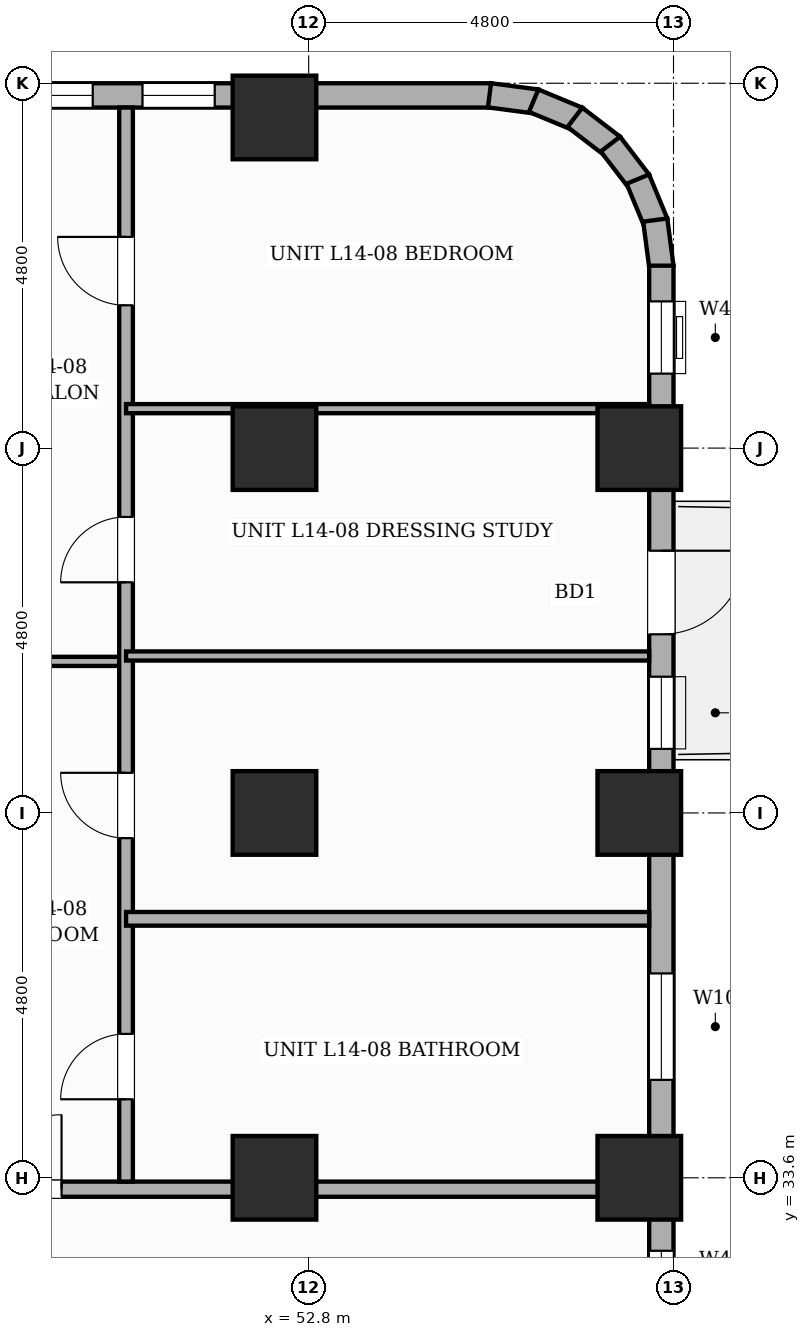
"""IFC4 building model, lengths in metres.
Left out: names, types, materials, properties, quantities, classifications, styles, units other than length and angle.
Written with IfcOpenShell. Run it as: python <this file> out.ifc"""

import sys

from ifc_helpers import new_model, si_unit, direction, frame, frame_2d, origin, origin_2d, place, context, subcontext, project, spatial, rectangle, extrude, element, fill, save


model = new_model("IFC4")
c1 = context("Model", 3, precision=1e-05, world=origin(), true_north=direction((0.0, 1.0)))
c2 = subcontext(c1, "Body", "Model", "MODEL_VIEW")
j1 = project(units=[si_unit("LENGTHUNIT", "METRE"), si_unit("PLANEANGLEUNIT", "RADIAN")], contexts=[c1])
p1 = place(None, origin())
s1 = spatial("IfcSite", under=j1, at=p1, CompositionType="ELEMENT")
p2 = place(p1, origin())
s2 = spatial("IfcBuilding", under=s1, at=p2, CompositionType="ELEMENT")
p3 = place(p2, frame((0.0, 0.0, 57.4)))
s3 = spatial("IfcBuildingStorey", under=s2, at=p3, CompositionType="ELEMENT", Elevation=57.4)
for number, where, z_axis, x_axis in (
    (1, (52.35, 33.6, 0.0), (0.0, 0.0, 1.0), (1.0, 0.0, 0.0)),
    (2, (52.35, 38.4, 0.0), (0.0, 0.0, 1.0), (1.0, 0.0, 0.0)),
    (3, (52.35, 43.2, 0.0), (0.0, 0.0, 1.0), (1.0, 0.0, 0.0)),
    (4, (52.35, 47.55, 0.0), (0.0, 0.0, 1.0), (1.0, 0.0, 0.0)),
    (5, (57.15, 33.6, 0.0), (0.0, 0.0, 1.0), (1.0, 0.0, 0.0)),
    (6, (57.15, 38.4, 0.0), (0.0, 0.0, 1.0), (1.0, 0.0, 0.0)),
    (7, (57.15, 43.2, 0.0), (0.0, 0.0, 1.0), (1.0, 0.0, 0.0)),
):
    element("IfcColumn", number, at=place(p3, frame(where, z_axis=z_axis, x_axis=x_axis)), inside=s3, PredefinedType="COLUMN", context=c2, shape_type="SweptSolid", body=[
        extrude(rectangle(XDim=1.1, YDim=1.1, at=origin_2d()), origin(), (0.0, 0.0, 1.0), 3.6),
    ])
p4 = place(p3, frame((7.2, 47.84, 0.0), z_axis=(0.0, 0.0, 1.0), x_axis=(1.0, 0.0, 0.0)))
e8 = element("IfcWall", 8, at=p4, inside=s3, PredefinedType="STANDARD", context=c2, shape_type="SweptSolid", body=[
    extrude(rectangle(XDim=48.0, YDim=0.32, at=frame_2d((24.0, 0.0))), origin(), (0.0, 0.0, 1.0), 2.53),
])
p5 = place(p4, frame((28.803, 0.0, 0.65)))
e9 = element("IfcOpeningElement", 9, at=p5, cuts=e8, PredefinedType="OPENING", context=c2, shape_type="SweptSolid", body=[
    extrude(rectangle(XDim=1.4, YDim=1.1, at=frame_2d((0.7, 0.55))), frame((0.0, 0.17, 0.0), z_axis=(0.0, -1.0, 0.0), x_axis=(1.0, 0.0, 0.0)), (0.0, 0.0, 1.0), 0.34),
])
p6 = place(p4, frame((43.414, 0.0, 0.45)))
e10 = element("IfcOpeningElement", 10, at=p6, cuts=e8, PredefinedType="OPENING", context=c2, shape_type="SweptSolid", body=[
    extrude(rectangle(XDim=0.95, YDim=1.8, at=frame_2d((0.475, 0.9))), frame((0.0, 0.17, 0.0), z_axis=(0.0, -1.0, 0.0), x_axis=(1.0, 0.0, 0.0)), (0.0, 0.0, 1.0), 0.34),
])
p7 = place(p4, frame((18.74, 0.0, 0.45)))
e11 = element("IfcOpeningElement", 11, at=p7, cuts=e8, PredefinedType="OPENING", context=c2, shape_type="SweptSolid", body=[
    extrude(rectangle(XDim=0.95, YDim=1.8, at=frame_2d((0.475, 0.9))), frame((0.0, 0.17, 0.0), z_axis=(0.0, -1.0, 0.0), x_axis=(1.0, 0.0, 0.0)), (0.0, 0.0, 1.0), 0.34),
])
p8 = place(p4, frame((37.825, 0.0, 0.65)))
e12 = element("IfcOpeningElement", 12, at=p8, cuts=e8, PredefinedType="OPENING", context=c2, shape_type="SweptSolid", body=[
    extrude(rectangle(XDim=1.4, YDim=1.1, at=frame_2d((0.7, 0.55))), frame((0.0, 0.17, 0.0), z_axis=(0.0, -1.0, 0.0), x_axis=(1.0, 0.0, 0.0)), (0.0, 0.0, 1.0), 0.34),
])
p9 = place(p4, frame((0.47, 0.0, 0.45)))
e13 = element("IfcOpeningElement", 13, at=p9, cuts=e8, PredefinedType="OPENING", context=c2, shape_type="SweptSolid", body=[
    extrude(rectangle(XDim=0.95, YDim=1.8, at=frame_2d((0.475, 0.9))), frame((0.0, 0.17, 0.0), z_axis=(0.0, -1.0, 0.0), x_axis=(1.0, 0.0, 0.0)), (0.0, 0.0, 1.0), 0.34),
])
p10 = place(p4, frame((5.265, 0.0, 0.45)))
e14 = element("IfcOpeningElement", 14, at=p10, cuts=e8, PredefinedType="OPENING", context=c2, shape_type="SweptSolid", body=[
    extrude(rectangle(XDim=0.95, YDim=1.8, at=frame_2d((0.475, 0.9))), frame((0.0, 0.17, 0.0), z_axis=(0.0, -1.0, 0.0), x_axis=(1.0, 0.0, 0.0)), (0.0, 0.0, 1.0), 0.34),
])
p11 = place(p4, frame((23.43, 0.0, 0.65)))
e15 = element("IfcOpeningElement", 15, at=p11, cuts=e8, PredefinedType="OPENING", context=c2, shape_type="SweptSolid", body=[
    extrude(rectangle(XDim=1.4, YDim=1.1, at=frame_2d((0.7, 0.55))), frame((0.0, 0.17, 0.0), z_axis=(0.0, -1.0, 0.0), x_axis=(1.0, 0.0, 0.0)), (0.0, 0.0, 1.0), 0.34),
])
p12 = place(p4, frame((41.809, 0.0, 0.45)))
e16 = element("IfcOpeningElement", 16, at=p12, cuts=e8, PredefinedType="OPENING", context=c2, shape_type="SweptSolid", body=[
    extrude(rectangle(XDim=0.95, YDim=1.8, at=frame_2d((0.475, 0.9))), frame((0.0, 0.17, 0.0), z_axis=(0.0, -1.0, 0.0), x_axis=(1.0, 0.0, 0.0)), (0.0, 0.0, 1.0), 0.34),
])
for number, where, z_axis, x_axis in (
    (17, (55.179, 47.841, 0.0), (0.0, 0.0, 1.0), (0.991, -0.131, 0.0)),
    (18, (55.76, 47.771, 0.0), (0.0, 0.0, 1.0), (0.924, -0.383, 0.0)),
):
    element("IfcWall", number, at=place(p3, frame(where, z_axis=z_axis, x_axis=x_axis)), inside=s3, PredefinedType="STANDARD", context=c2, shape_type="SweptSolid", body=[
        extrude(rectangle(XDim=0.626, YDim=0.32, at=frame_2d((0.313, 0.0))), origin(), (0.0, 0.0, 1.0), 3.35),
    ])
p13 = place(p3, frame((56.302, 47.552, 0.0), z_axis=(0.0, 0.0, 1.0), x_axis=(0.793549926411, -0.608505147302, 0.0)))
e19 = element("IfcWall", 19, at=p13, inside=s3, PredefinedType="STANDARD", context=c2, shape_type="SweptSolid", body=[
    extrude(rectangle(XDim=0.627, YDim=0.32, at=frame_2d((0.313, 0.0))), origin(), (0.0, 0.0, 1.0), 3.35),
])
for number, where, z_axis, x_axis in (
    (20, (56.77, 47.2, 0.0), (0.0, 0.0, 1.0), (0.609, -0.793, 0.0)),
    (21, (57.131, 46.739, 0.0), (0.0, 0.0, 1.0), (0.383, -0.924, 0.0)),
    (22, (57.36, 46.2, 0.0), (0.0, 0.0, 1.0), (0.131, -0.991, 0.0)),
):
    element("IfcWall", number, at=place(p3, frame(where, z_axis=z_axis, x_axis=x_axis)), inside=s3, PredefinedType="STANDARD", context=c2, shape_type="SweptSolid", body=[
        extrude(rectangle(XDim=0.626, YDim=0.32, at=frame_2d((0.313, 0.0))), origin(), (0.0, 0.0, 1.0), 3.35),
    ])
p14 = place(p3, frame((57.44, 45.6, 0.0), z_axis=(0.0, 0.0, 1.0), x_axis=(0.0, -1.0, 0.0)))
e23 = element("IfcWall", 23, at=p14, inside=s3, PredefinedType="STANDARD", context=c2, shape_type="SweptSolid", body=[
    extrude(rectangle(XDim=14.4, YDim=0.32, at=frame_2d((7.2, 0.0))), origin(), (0.0, 0.0, 1.0), 2.53),
])
p15 = place(p14, frame((3.75, 0.0, 0.0)))
e24 = element("IfcOpeningElement", 24, at=p15, cuts=e23, PredefinedType="OPENING", context=c2, shape_type="SweptSolid", body=[
    extrude(rectangle(XDim=1.1, YDim=2.15, at=frame_2d((0.55, 1.075))), frame((0.0, 0.17, 0.0), z_axis=(0.0, -1.0, 0.0), x_axis=(1.0, 0.0, 0.0)), (0.0, 0.0, 1.0), 0.34),
])
p16 = place(p14, frame((0.47, 0.0, 0.45)))
e25 = element("IfcOpeningElement", 25, at=p16, cuts=e23, PredefinedType="OPENING", context=c2, shape_type="SweptSolid", body=[
    extrude(rectangle(XDim=0.95, YDim=1.8, at=frame_2d((0.475, 0.9))), frame((0.0, 0.17, 0.0), z_axis=(0.0, -1.0, 0.0), x_axis=(1.0, 0.0, 0.0)), (0.0, 0.0, 1.0), 0.34),
])
p17 = place(p14, frame((12.96, 0.0, 0.45)))
e26 = element("IfcOpeningElement", 26, at=p17, cuts=e23, PredefinedType="OPENING", context=c2, shape_type="SweptSolid", body=[
    extrude(rectangle(XDim=0.95, YDim=1.8, at=frame_2d((0.475, 0.9))), frame((0.0, 0.17, 0.0), z_axis=(0.0, -1.0, 0.0), x_axis=(1.0, 0.0, 0.0)), (0.0, 0.0, 1.0), 0.34),
])
p18 = place(p14, frame((9.312, 0.0, 0.65)))
e27 = element("IfcOpeningElement", 27, at=p18, cuts=e23, PredefinedType="OPENING", context=c2, shape_type="SweptSolid", body=[
    extrude(rectangle(XDim=1.4, YDim=1.1, at=frame_2d((0.7, 0.55))), frame((0.0, 0.17, 0.0), z_axis=(0.0, -1.0, 0.0), x_axis=(1.0, 0.0, 0.0)), (0.0, 0.0, 1.0), 0.34),
])
p19 = place(p14, frame((5.407, 0.0, 0.45)))
e28 = element("IfcOpeningElement", 28, at=p19, cuts=e23, PredefinedType="OPENING", context=c2, shape_type="SweptSolid", body=[
    extrude(rectangle(XDim=0.95, YDim=1.8, at=frame_2d((0.475, 0.9))), frame((0.0, 0.17, 0.0), z_axis=(0.0, -1.0, 0.0), x_axis=(1.0, 0.0, 0.0)), (0.0, 0.0, 1.0), 0.34),
])
p20 = place(p3, frame((44.02, 33.45, 0.0), z_axis=(0.0, 0.0, 1.0), x_axis=(1.0, 0.0, 0.0)))
e29 = element("IfcWall", 29, at=p20, inside=s3, PredefinedType="PARTITIONING", context=c2, shape_type="SweptSolid", body=[
    extrude(rectangle(XDim=13.26, YDim=0.2, at=frame_2d((6.63, 0.0))), origin(), (0.0, 0.0, 1.0), 2.53),
])
p21 = place(p20, frame((4.549, 0.0, 0.0)))
e30 = element("IfcOpeningElement", 30, at=p21, cuts=e29, PredefinedType="OPENING", context=c2, shape_type="SweptSolid", body=[
    extrude(rectangle(XDim=0.98, YDim=2.18, at=frame_2d((0.49, 1.09))), frame((0.0, 0.11, 0.0), z_axis=(0.0, -1.0, 0.0), x_axis=(1.0, 0.0, 0.0)), (0.0, 0.0, 1.0), 0.22),
])
p22 = place(p3, frame((47.64, 40.394, 0.0), z_axis=(0.0, 0.0, 1.0), x_axis=(1.0, 0.0, 0.0)))
e31 = element("IfcWall", 31, at=p22, inside=s3, PredefinedType="PARTITIONING", context=c2, shape_type="SweptSolid", body=[
    extrude(rectangle(XDim=2.757, YDim=0.12, at=frame_2d((1.378, 0.0))), origin(), (0.0, 0.0, 1.0), 3.35),
])
p23 = place(p22, frame((0.8, 0.0, 0.0)))
e32 = element("IfcOpeningElement", 32, at=p23, cuts=e31, PredefinedType="OPENING", context=c2, shape_type="SweptSolid", body=[
    extrude(rectangle(XDim=0.9, YDim=2.15, at=frame_2d((0.45, 1.075))), frame((0.0, 0.07, 0.0), z_axis=(0.0, -1.0, 0.0), x_axis=(1.0, 0.0, 0.0)), (0.0, 0.0, 1.0), 0.14),
])
p24 = place(p3, frame((50.397, 33.55, 0.0), z_axis=(0.0, 0.0, 1.0), x_axis=(0.0, 1.0, 0.0)))
e33 = element("IfcWall", 33, at=p24, inside=s3, PredefinedType="PLUMBINGWALL", context=c2, shape_type="SweptSolid", body=[
    extrude(rectangle(XDim=14.13, YDim=0.18, at=frame_2d((7.065, 0.0))), origin(), (0.0, 0.0, 1.0), 3.35),
])
p25 = place(p24, frame((1.083, 0.0, 0.0)))
e34 = element("IfcOpeningElement", 34, at=p25, cuts=e33, PredefinedType="OPENING", context=c2, shape_type="SweptSolid", body=[
    extrude(rectangle(XDim=0.86, YDim=2.1, at=frame_2d((0.43, 1.05))), frame((0.0, 0.1, 0.0), z_axis=(0.0, -1.0, 0.0), x_axis=(1.0, 0.0, 0.0)), (0.0, 0.0, 1.0), 0.2),
])
p26 = place(p24, frame((4.518, 0.0, 0.0)))
e35 = element("IfcOpeningElement", 35, at=p26, cuts=e33, PredefinedType="OPENING", context=c2, shape_type="SweptSolid", body=[
    extrude(rectangle(XDim=0.86, YDim=2.1, at=frame_2d((0.43, 1.05))), frame((0.0, 0.1, 0.0), z_axis=(0.0, -1.0, 0.0), x_axis=(1.0, 0.0, 0.0)), (0.0, 0.0, 1.0), 0.2),
])
p27 = place(p24, frame((7.884, 0.0, 0.0)))
e36 = element("IfcOpeningElement", 36, at=p27, cuts=e33, PredefinedType="OPENING", context=c2, shape_type="SweptSolid", body=[
    extrude(rectangle(XDim=0.86, YDim=2.1, at=frame_2d((0.43, 1.05))), frame((0.0, 0.1, 0.0), z_axis=(0.0, -1.0, 0.0), x_axis=(1.0, 0.0, 0.0)), (0.0, 0.0, 1.0), 0.2),
])
p28 = place(p24, frame((11.528, 0.0, 0.0)))
e37 = element("IfcOpeningElement", 37, at=p28, cuts=e33, PredefinedType="OPENING", context=c2, shape_type="SweptSolid", body=[
    extrude(rectangle(XDim=0.9, YDim=2.15, at=frame_2d((0.45, 1.075))), frame((0.0, 0.1, 0.0), z_axis=(0.0, -1.0, 0.0), x_axis=(1.0, 0.0, 0.0)), (0.0, 0.0, 1.0), 0.2),
])
p29 = place(p3, frame((50.397, 37.007, 0.0), z_axis=(0.0, 0.0, 1.0), x_axis=(1.0, 0.0, 0.0)))
e38 = element("IfcWall", 38, at=p29, inside=s3, PredefinedType="PLUMBINGWALL", context=c2, shape_type="SweptSolid", body=[
    extrude(rectangle(XDim=6.883, YDim=0.18, at=frame_2d((3.441, 0.0))), origin(), (0.0, 0.0, 1.0), 3.35),
])
for number, where, z_axis, x_axis in (
    (39, (50.397, 40.465, 0.0), (0.0, 0.0, 1.0), (1.0, 0.0, 0.0)),
    (40, (50.397, 43.719, 0.0), (0.0, 0.0, 1.0), (1.0, 0.0, 0.0)),
):
    element("IfcWall", number, at=place(p3, frame(where, z_axis=z_axis, x_axis=x_axis)), inside=s3, PredefinedType="PARTITIONING", context=c2, shape_type="SweptSolid", body=[
        extrude(rectangle(XDim=6.883, YDim=0.12, at=frame_2d((3.441, 0.0))), origin(), (0.0, 0.0, 1.0), 3.35),
    ])
p30 = place(p6, origin())
e41 = element("IfcWindow", 41, at=p30, inside=s3, PartitioningType="SINGLE_PANEL", PredefinedType="WINDOW", context=c2, shape_type="SweptSolid", body=[
    extrude(rectangle(XDim=0.95, YDim=1.8, at=frame_2d((0.475, 0.9))), frame((0.0, 0.03, 0.0), z_axis=(0.0, -1.0, 0.0), x_axis=(1.0, 0.0, 0.0)), (0.0, 0.0, 1.0), 0.06),
])
fill(e10, e41)
p31 = place(p12, origin())
e42 = element("IfcWindow", 42, at=p31, inside=s3, PartitioningType="SINGLE_PANEL", PredefinedType="WINDOW", context=c2, shape_type="SweptSolid", body=[
    extrude(rectangle(XDim=0.95, YDim=1.8, at=frame_2d((0.475, 0.9))), frame((0.0, 0.03, 0.0), z_axis=(0.0, -1.0, 0.0), x_axis=(1.0, 0.0, 0.0)), (0.0, 0.0, 1.0), 0.06),
])
fill(e16, e42)
p32 = place(p15, origin())
e43 = element("IfcDoor", 43, at=p32, inside=s3, OperationType="SINGLE_SWING_LEFT", PredefinedType="DOOR", context=c2, shape_type="SweptSolid", body=[
    extrude(rectangle(XDim=1.1, YDim=2.15, at=frame_2d((0.55, 1.075))), frame((0.0, 0.025, 0.0), z_axis=(0.0, -1.0, 0.0), x_axis=(1.0, 0.0, 0.0)), (0.0, 0.0, 1.0), 0.05),
])
fill(e24, e43)
p33 = place(p16, origin())
e44 = element("IfcWindow", 44, at=p33, inside=s3, PartitioningType="SINGLE_PANEL", PredefinedType="WINDOW", context=c2, shape_type="SweptSolid", body=[
    extrude(rectangle(XDim=0.95, YDim=1.8, at=frame_2d((0.475, 0.9))), frame((0.0, 0.03, 0.0), z_axis=(0.0, -1.0, 0.0), x_axis=(1.0, 0.0, 0.0)), (0.0, 0.0, 1.0), 0.06),
])
fill(e25, e44)
p34 = place(p17, origin())
e45 = element("IfcWindow", 45, at=p34, inside=s3, PartitioningType="SINGLE_PANEL", PredefinedType="WINDOW", context=c2, shape_type="SweptSolid", body=[
    extrude(rectangle(XDim=0.95, YDim=1.8, at=frame_2d((0.475, 0.9))), frame((0.0, 0.03, 0.0), z_axis=(0.0, -1.0, 0.0), x_axis=(1.0, 0.0, 0.0)), (0.0, 0.0, 1.0), 0.06),
])
fill(e26, e45)
p35 = place(p18, origin())
e46 = element("IfcWindow", 46, at=p35, inside=s3, PartitioningType="SINGLE_PANEL", PredefinedType="WINDOW", context=c2, shape_type="SweptSolid", body=[
    extrude(rectangle(XDim=1.4, YDim=1.1, at=frame_2d((0.7, 0.55))), frame((0.0, 0.03, 0.0), z_axis=(0.0, -1.0, 0.0), x_axis=(1.0, 0.0, 0.0)), (0.0, 0.0, 1.0), 0.06),
])
fill(e27, e46)
p36 = place(p19, origin())
e47 = element("IfcWindow", 47, at=p36, inside=s3, PartitioningType="SINGLE_PANEL", PredefinedType="WINDOW", context=c2, shape_type="SweptSolid", body=[
    extrude(rectangle(XDim=0.95, YDim=1.8, at=frame_2d((0.475, 0.9))), frame((0.0, 0.03, 0.0), z_axis=(0.0, -1.0, 0.0), x_axis=(1.0, 0.0, 0.0)), (0.0, 0.0, 1.0), 0.06),
])
fill(e28, e47)
p37 = place(p21, origin())
e48 = element("IfcDoor", 48, at=p37, inside=s3, OperationType="SINGLE_SWING_RIGHT", PredefinedType="DOOR", context=c2, shape_type="SweptSolid", body=[
    extrude(rectangle(XDim=0.98, YDim=2.18, at=frame_2d((0.49, 1.09))), frame((0.0, 0.025, 0.0), z_axis=(0.0, -1.0, 0.0), x_axis=(1.0, 0.0, 0.0)), (0.0, 0.0, 1.0), 0.05),
])
fill(e30, e48)
p38 = place(p25, origin())
e49 = element("IfcDoor", 49, at=p38, inside=s3, OperationType="SINGLE_SWING_LEFT", PredefinedType="DOOR", context=c2, shape_type="SweptSolid", body=[
    extrude(rectangle(XDim=0.86, YDim=2.1, at=frame_2d((0.43, 1.05))), frame((0.0, 0.025, 0.0), z_axis=(0.0, -1.0, 0.0), x_axis=(1.0, 0.0, 0.0)), (0.0, 0.0, 1.0), 0.05),
])
fill(e34, e49)
p39 = place(p26, origin())
e50 = element("IfcDoor", 50, at=p39, inside=s3, OperationType="SINGLE_SWING_RIGHT", PredefinedType="DOOR", context=c2, shape_type="SweptSolid", body=[
    extrude(rectangle(XDim=0.86, YDim=2.1, at=frame_2d((0.43, 1.05))), frame((0.0, 0.025, 0.0), z_axis=(0.0, -1.0, 0.0), x_axis=(1.0, 0.0, 0.0)), (0.0, 0.0, 1.0), 0.05),
])
fill(e35, e50)
p40 = place(p27, origin())
e51 = element("IfcDoor", 51, at=p40, inside=s3, OperationType="SINGLE_SWING_LEFT", PredefinedType="DOOR", context=c2, shape_type="SweptSolid", body=[
    extrude(rectangle(XDim=0.86, YDim=2.1, at=frame_2d((0.43, 1.05))), frame((0.0, 0.025, 0.0), z_axis=(0.0, -1.0, 0.0), x_axis=(1.0, 0.0, 0.0)), (0.0, 0.0, 1.0), 0.05),
])
fill(e36, e51)
p41 = place(p28, origin())
e52 = element("IfcDoor", 52, at=p41, inside=s3, OperationType="SINGLE_SWING_RIGHT", PredefinedType="DOOR", context=c2, shape_type="SweptSolid", body=[
    extrude(rectangle(XDim=0.9, YDim=2.15, at=frame_2d((0.45, 1.075))), frame((0.0, 0.025, 0.0), z_axis=(0.0, -1.0, 0.0), x_axis=(1.0, 0.0, 0.0)), (0.0, 0.0, 1.0), 0.05),
])
fill(e37, e52)
save(model, sys.argv[1])
